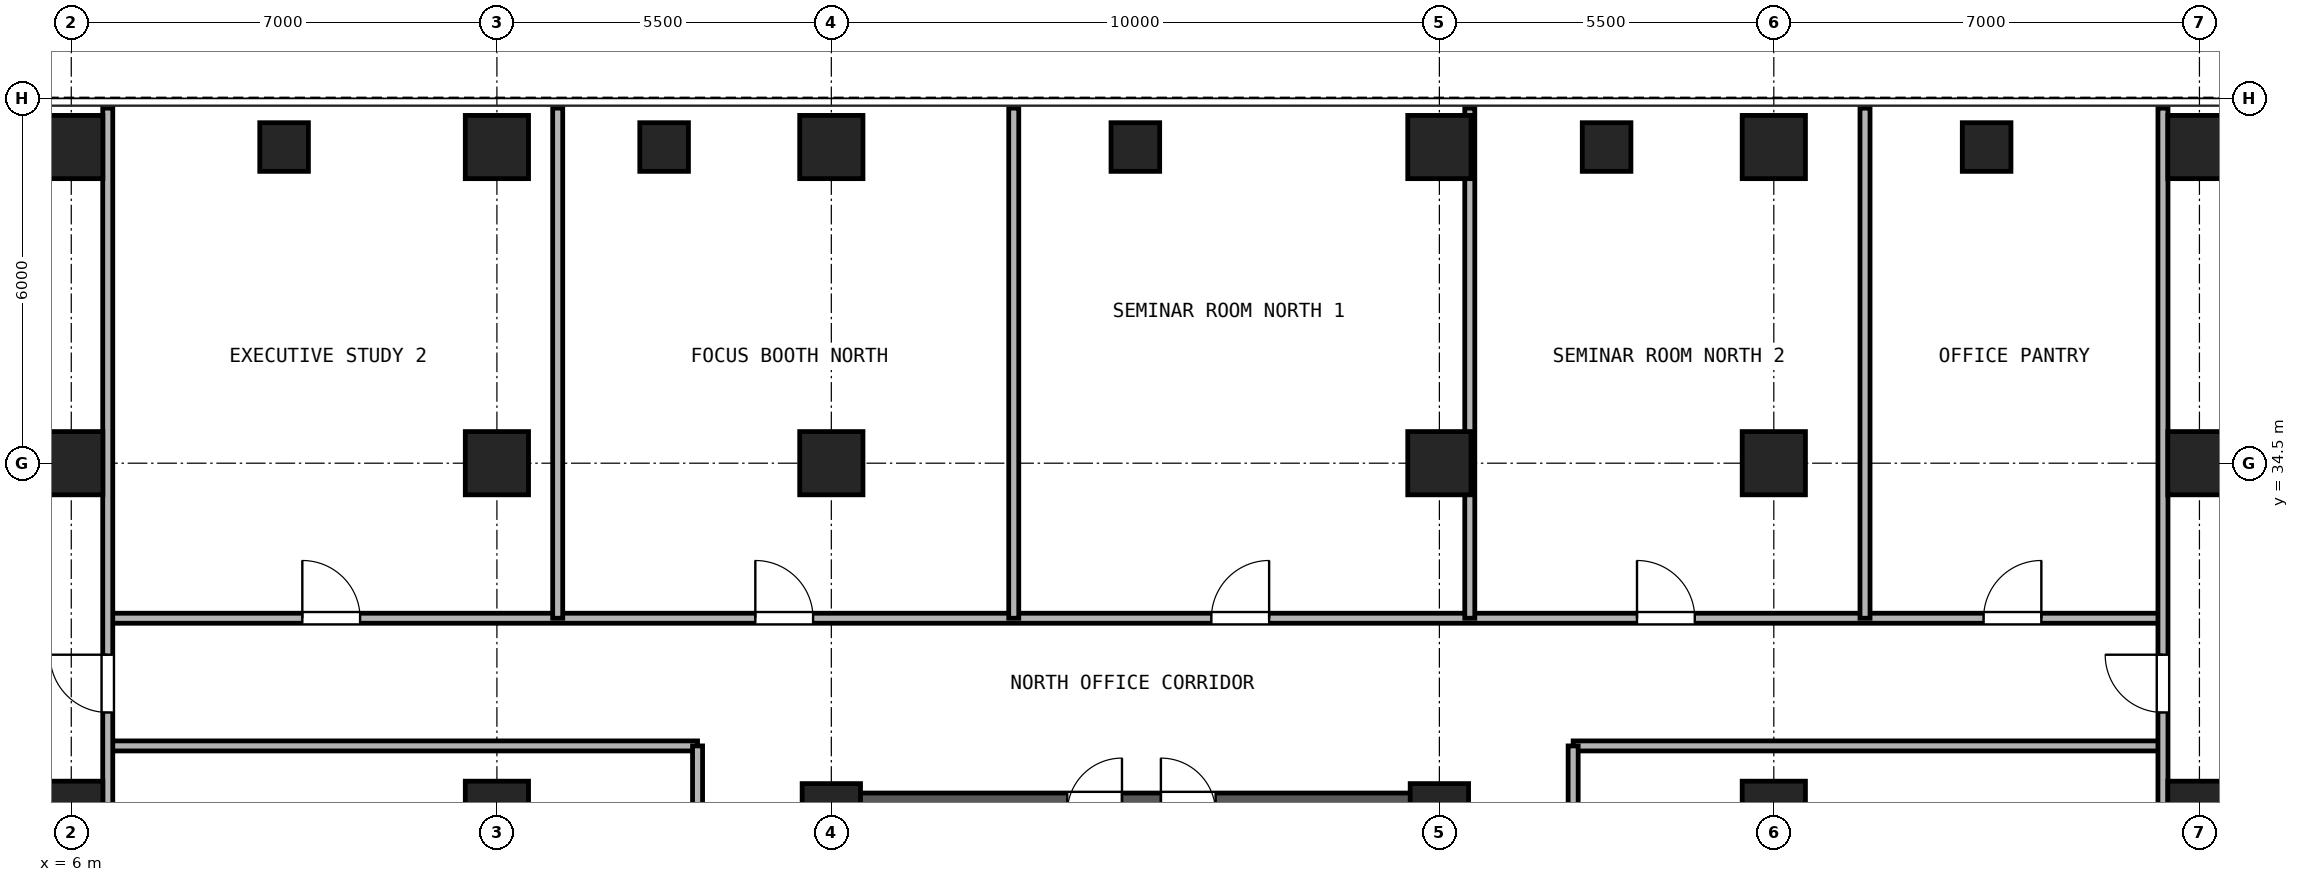
"""IFC4 building model, lengths in metres.
Left out: names, types, materials, properties, quantities, classifications, styles, units other than length and angle.
Written with IfcOpenShell. Run it as: python <this file> out.ifc"""

import sys

from ifc_helpers import new_model, si_unit, direction, frame, frame_2d, origin, origin_2d, place, context, subcontext, project, spatial, rectangle, hollow_rectangle, extrude, source, transform, mapped, element, fill, save


model = new_model("IFC4")
c1 = context("Model", 3, precision=1e-05, world=origin(), true_north=direction((0.0, 1.0)))
c2 = subcontext(c1, "Body", "Model", "MODEL_VIEW")
j1 = project(units=[si_unit("LENGTHUNIT", "METRE"), si_unit("PLANEANGLEUNIT", "RADIAN")], contexts=[c1])
p1 = place(None, origin())
s1 = spatial("IfcSite", under=j1, at=p1, CompositionType="ELEMENT")
p2 = place(p1, origin())
s2 = spatial("IfcBuilding", under=s1, at=p2, CompositionType="ELEMENT")
p3 = place(p2, frame((0.0, 0.0, 81.0)))
s3 = spatial("IfcBuildingStorey", under=s2, at=p3, CompositionType="ELEMENT", Elevation=81.0)
m1 = source(origin(), c2, "Body", "SweptSolid", [
    extrude(hollow_rectangle(XDim=1.04, YDim=1.04, WallThickness=0.065, at=origin_2d()), origin(), (0.0, 0.0, 1.0), 3.32),
])
for number, where, z_axis, x_axis in (
    (1, (6.0, 39.7, 0.0), (0.0, 0.0, 1.0), (1.0, 0.0, 0.0)),
    (2, (13.0, 39.7, 0.0), (0.0, 0.0, 1.0), (1.0, 0.0, 0.0)),
    (3, (18.5, 39.7, 0.0), (0.0, 0.0, 1.0), (1.0, 0.0, 0.0)),
    (4, (28.5, 39.7, 0.0), (0.0, 0.0, 1.0), (1.0, 0.0, 0.0)),
    (5, (34.0, 39.7, 0.0), (0.0, 0.0, 1.0), (1.0, 0.0, 0.0)),
    (6, (41.0, 39.7, 0.0), (0.0, 0.0, 1.0), (1.0, 0.0, 0.0)),
    (7, (6.0, 28.75, 0.0), (0.0, 0.0, 1.0), (1.0, 0.0, 0.0)),
    (8, (6.0, 34.5, 0.0), (0.0, 0.0, 1.0), (1.0, 0.0, 0.0)),
    (9, (13.0, 28.75, 0.0), (0.0, 0.0, 1.0), (1.0, 0.0, 0.0)),
    (10, (13.0, 34.5, 0.0), (0.0, 0.0, 1.0), (1.0, 0.0, 0.0)),
):
    element("IfcColumn", number, at=place(p3, frame(where, z_axis=z_axis, x_axis=x_axis)), inside=s3, PredefinedType="COLUMN", context=c2, shape_type="MappedRepresentation", body=[
        mapped(m1, transform((0.0, 0.0, 0.0), x_axis=(1.0, 0.0, 0.0), y_axis=(0.0, 1.0, 0.0), z_axis=(0.0, 0.0, 1.0), scale=1.0)),
    ])
m2 = source(origin(), c2, "Body", "SweptSolid", [
    extrude(hollow_rectangle(XDim=0.96, YDim=0.96, WallThickness=0.06, at=origin_2d()), origin(), (0.0, 0.0, 1.0), 3.32),
])
p4 = place(p3, frame((18.5, 28.75, 0.0), z_axis=(0.0, 0.0, 1.0), x_axis=(1.0, 0.0, 0.0)))
e11 = element("IfcColumn", 11, at=p4, inside=s3, PredefinedType="COLUMN", context=c2, shape_type="MappedRepresentation", body=[
    mapped(m2, transform((0.0, 0.0, 0.0), x_axis=(1.0, 0.0, 0.0), y_axis=(0.0, 1.0, 0.0), z_axis=(0.0, 0.0, 1.0), scale=1.0)),
])
p5 = place(p3, frame((18.5, 34.5, 0.0), z_axis=(0.0, 0.0, 1.0), x_axis=(1.0, 0.0, 0.0)))
e12 = element("IfcColumn", 12, at=p5, inside=s3, PredefinedType="COLUMN", context=c2, shape_type="MappedRepresentation", body=[
    mapped(m1, transform((0.0, 0.0, 0.0), x_axis=(1.0, 0.0, 0.0), y_axis=(0.0, 1.0, 0.0), z_axis=(0.0, 0.0, 1.0), scale=1.0)),
])
p6 = place(p3, frame((28.5, 28.75, 0.0), z_axis=(0.0, 0.0, 1.0), x_axis=(1.0, 0.0, 0.0)))
e13 = element("IfcColumn", 13, at=p6, inside=s3, PredefinedType="COLUMN", context=c2, shape_type="MappedRepresentation", body=[
    mapped(m2, transform((0.0, 0.0, 0.0), x_axis=(1.0, 0.0, 0.0), y_axis=(0.0, 1.0, 0.0), z_axis=(0.0, 0.0, 1.0), scale=1.0)),
])
for number, where, z_axis, x_axis in (
    (14, (28.5, 34.5, 0.0), (0.0, 0.0, 1.0), (1.0, 0.0, 0.0)),
    (15, (34.0, 28.75, 0.0), (0.0, 0.0, 1.0), (1.0, 0.0, 0.0)),
    (16, (34.0, 34.5, 0.0), (0.0, 0.0, 1.0), (1.0, 0.0, 0.0)),
    (17, (41.0, 28.75, 0.0), (0.0, 0.0, 1.0), (1.0, 0.0, 0.0)),
    (18, (41.0, 34.5, 0.0), (0.0, 0.0, 1.0), (1.0, 0.0, 0.0)),
):
    element("IfcColumn", number, at=place(p3, frame(where, z_axis=z_axis, x_axis=x_axis)), inside=s3, PredefinedType="COLUMN", context=c2, shape_type="MappedRepresentation", body=[
        mapped(m1, transform((0.0, 0.0, 0.0), x_axis=(1.0, 0.0, 0.0), y_axis=(0.0, 1.0, 0.0), z_axis=(0.0, 0.0, 1.0), scale=1.0)),
    ])
m3 = source(origin(), c2, "Body", "SweptSolid", [
    extrude(hollow_rectangle(XDim=0.8, YDim=0.8, WallThickness=0.045, at=origin_2d()), origin(), (0.0, 0.0, 1.0), 3.32),
])
for number, where, z_axis, x_axis in (
    (19, (9.5, 39.7, 0.0), (0.0, 0.0, 1.0), (1.0, 0.0, 0.0)),
    (20, (15.75, 39.7, 0.0), (0.0, 0.0, 1.0), (1.0, 0.0, 0.0)),
    (21, (23.5, 39.7, 0.0), (0.0, 0.0, 1.0), (1.0, 0.0, 0.0)),
    (22, (31.25, 39.7, 0.0), (0.0, 0.0, 1.0), (1.0, 0.0, 0.0)),
    (23, (37.5, 39.7, 0.0), (0.0, 0.0, 1.0), (1.0, 0.0, 0.0)),
):
    element("IfcColumn", number, at=place(p3, frame(where, z_axis=z_axis, x_axis=x_axis)), inside=s3, PredefinedType="COLUMN", context=c2, shape_type="MappedRepresentation", body=[
        mapped(m3, transform((0.0, 0.0, 0.0), x_axis=(1.0, 0.0, 0.0), y_axis=(0.0, 1.0, 0.0), z_axis=(0.0, 0.0, 1.0), scale=1.0)),
    ])
p7 = place(p3, frame((18.175, 28.75, 0.0), z_axis=(0.0, 0.0, 1.0), x_axis=(1.0, 0.0, 0.0)))
e24 = element("IfcWall", 24, at=p7, inside=s3, PredefinedType="SHEAR", context=c2, shape_type="SweptSolid", body=[
    extrude(rectangle(XDim=10.65, YDim=0.65, at=frame_2d((5.325, 0.0))), origin(), (0.0, 0.0, 1.0), 3.32),
])
p8 = place(p7, frame((4.205, 0.0, 0.0)))
e25 = element("IfcOpeningElement", 25, at=p8, cuts=e24, PredefinedType="OPENING", context=c2, shape_type="SweptSolid", body=[
    extrude(rectangle(XDim=0.9, YDim=2.05, at=frame_2d((0.45, 1.025))), frame((0.0, 0.335, 0.0), z_axis=(0.0, -1.0, 0.0), x_axis=(1.0, 0.0, 0.0)), (0.0, 0.0, 1.0), 0.67),
])
p9 = place(p7, frame((5.745, 0.0, 0.0)))
e26 = element("IfcOpeningElement", 26, at=p9, cuts=e24, PredefinedType="OPENING", context=c2, shape_type="SweptSolid", body=[
    extrude(rectangle(XDim=0.9, YDim=2.05, at=frame_2d((0.45, 1.025))), frame((0.0, 0.335, 0.0), z_axis=(0.0, -1.0, 0.0), x_axis=(1.0, 0.0, 0.0)), (0.0, 0.0, 1.0), 0.67),
])
p10 = place(p3, frame((6.6, 31.95, 0.0), z_axis=(0.0, 0.0, 1.0), x_axis=(1.0, 0.0, 0.0)))
e27 = element("IfcWall", 27, at=p10, inside=s3, PredefinedType="PARTITIONING", context=c2, shape_type="SweptSolid", body=[
    extrude(rectangle(XDim=33.8, YDim=0.165, at=frame_2d((16.9, 0.0))), origin(), (0.0, 0.0, 1.0), 3.32),
])
p11 = place(p10, frame((3.2, 0.0, 0.0)))
e28 = element("IfcOpeningElement", 28, at=p11, cuts=e27, PredefinedType="OPENING", context=c2, shape_type="SweptSolid", body=[
    extrude(rectangle(XDim=0.95, YDim=2.15, at=frame_2d((0.475, 1.075))), frame((0.0, 0.093, 0.0), z_axis=(0.0, -1.0, 0.0), x_axis=(1.0, 0.0, 0.0)), (0.0, 0.0, 1.0), 0.185),
])
p12 = place(p10, frame((10.65, 0.0, 0.0)))
e29 = element("IfcOpeningElement", 29, at=p12, cuts=e27, PredefinedType="OPENING", context=c2, shape_type="SweptSolid", body=[
    extrude(rectangle(XDim=0.95, YDim=2.15, at=frame_2d((0.475, 1.075))), frame((0.0, 0.093, 0.0), z_axis=(0.0, -1.0, 0.0), x_axis=(1.0, 0.0, 0.0)), (0.0, 0.0, 1.0), 0.185),
])
p13 = place(p10, frame((18.15, 0.0, 0.0)))
e30 = element("IfcOpeningElement", 30, at=p13, cuts=e27, PredefinedType="OPENING", context=c2, shape_type="SweptSolid", body=[
    extrude(rectangle(XDim=0.95, YDim=2.15, at=frame_2d((0.475, 1.075))), frame((0.0, 0.093, 0.0), z_axis=(0.0, -1.0, 0.0), x_axis=(1.0, 0.0, 0.0)), (0.0, 0.0, 1.0), 0.185),
])
p14 = place(p10, frame((25.15, 0.0, 0.0)))
e31 = element("IfcOpeningElement", 31, at=p14, cuts=e27, PredefinedType="OPENING", context=c2, shape_type="SweptSolid", body=[
    extrude(rectangle(XDim=0.95, YDim=2.15, at=frame_2d((0.475, 1.075))), frame((0.0, 0.093, 0.0), z_axis=(0.0, -1.0, 0.0), x_axis=(1.0, 0.0, 0.0)), (0.0, 0.0, 1.0), 0.185),
])
p15 = place(p10, frame((30.85, 0.0, 0.0)))
e32 = element("IfcOpeningElement", 32, at=p15, cuts=e27, PredefinedType="OPENING", context=c2, shape_type="SweptSolid", body=[
    extrude(rectangle(XDim=0.95, YDim=2.15, at=frame_2d((0.475, 1.075))), frame((0.0, 0.093, 0.0), z_axis=(0.0, -1.0, 0.0), x_axis=(1.0, 0.0, 0.0)), (0.0, 0.0, 1.0), 0.185),
])
for number, where, z_axis, x_axis in (
    (33, (6.6, 29.85, 0.0), (0.0, 0.0, 1.0), (1.0, 0.0, 0.0)),
    (34, (30.7, 29.85, 0.0), (0.0, 0.0, 1.0), (1.0, 0.0, 0.0)),
):
    element("IfcWall", number, at=place(p3, frame(where, z_axis=z_axis, x_axis=x_axis)), inside=s3, PredefinedType="PARTITIONING", context=c2, shape_type="SweptSolid", body=[
        extrude(rectangle(XDim=9.7, YDim=0.165, at=frame_2d((4.85, 0.0))), origin(), (0.0, 0.0, 1.0), 3.32),
    ])
p16 = place(p3, frame((16.3, 9.9, 0.0), z_axis=(0.0, 0.0, 1.0), x_axis=(0.0, 1.0, 0.0)))
e35 = element("IfcWall", 35, at=p16, inside=s3, PredefinedType="PARTITIONING", context=c2, shape_type="SweptSolid", body=[
    extrude(rectangle(XDim=19.95, YDim=0.165, at=frame_2d((9.975, 0.0))), origin(), (0.0, 0.0, 1.0), 3.32),
])
p17 = place(p16, frame((5.937, 0.0, 0.0)))
e36 = element("IfcOpeningElement", 36, at=p17, cuts=e35, PredefinedType="OPENING", context=c2, shape_type="SweptSolid", body=[
    extrude(rectangle(XDim=0.95, YDim=2.15, at=frame_2d((0.475, 1.075))), frame((0.0, 0.093, 0.0), z_axis=(0.0, -1.0, 0.0), x_axis=(1.0, 0.0, 0.0)), (0.0, 0.0, 1.0), 0.185),
])
p18 = place(p16, frame((15.911, 0.0, 0.0)))
e37 = element("IfcOpeningElement", 37, at=p18, cuts=e35, PredefinedType="OPENING", context=c2, shape_type="SweptSolid", body=[
    extrude(rectangle(XDim=0.95, YDim=2.15, at=frame_2d((0.475, 1.075))), frame((0.0, 0.093, 0.0), z_axis=(0.0, -1.0, 0.0), x_axis=(1.0, 0.0, 0.0)), (0.0, 0.0, 1.0), 0.185),
])
p19 = place(p3, frame((30.7, 9.9, 0.0), z_axis=(0.0, 0.0, 1.0), x_axis=(0.0, 1.0, 0.0)))
e38 = element("IfcWall", 38, at=p19, inside=s3, PredefinedType="PARTITIONING", context=c2, shape_type="SweptSolid", body=[
    extrude(rectangle(XDim=19.95, YDim=0.165, at=frame_2d((9.975, 0.0))), origin(), (0.0, 0.0, 1.0), 3.32),
])
p20 = place(p19, frame((9.475, 0.0, 0.0)))
e39 = element("IfcOpeningElement", 39, at=p20, cuts=e38, PredefinedType="OPENING", context=c2, shape_type="SweptSolid", body=[
    extrude(rectangle(XDim=0.95, YDim=2.15, at=frame_2d((0.475, 1.075))), frame((0.0, 0.093, 0.0), z_axis=(0.0, -1.0, 0.0), x_axis=(1.0, 0.0, 0.0)), (0.0, 0.0, 1.0), 0.185),
])
p21 = place(p3, frame((6.6, 0.16, 0.0), z_axis=(0.0, 0.0, 1.0), x_axis=(0.0, 1.0, 0.0)))
e40 = element("IfcWall", 40, at=p21, inside=s3, PredefinedType="PARTITIONING", context=c2, shape_type="SweptSolid", body=[
    extrude(rectangle(XDim=40.18, YDim=0.165, at=frame_2d((20.09, 0.0))), origin(), (0.0, 0.0, 1.0), 3.32),
])
p22 = place(p21, frame((8.19, 0.0, 0.0)))
e41 = element("IfcOpeningElement", 41, at=p22, cuts=e40, PredefinedType="OPENING", context=c2, shape_type="SweptSolid", body=[
    extrude(rectangle(XDim=0.95, YDim=2.15, at=frame_2d((0.475, 1.075))), frame((0.0, 0.093, 0.0), z_axis=(0.0, -1.0, 0.0), x_axis=(1.0, 0.0, 0.0)), (0.0, 0.0, 1.0), 0.185),
])
p23 = place(p21, frame((30.24, 0.0, 0.0)))
e42 = element("IfcOpeningElement", 42, at=p23, cuts=e40, PredefinedType="OPENING", context=c2, shape_type="SweptSolid", body=[
    extrude(rectangle(XDim=0.95, YDim=2.15, at=frame_2d((0.475, 1.075))), frame((0.0, 0.093, 0.0), z_axis=(0.0, -1.0, 0.0), x_axis=(1.0, 0.0, 0.0)), (0.0, 0.0, 1.0), 0.185),
])
p24 = place(p3, frame((40.4, 0.16, 0.0), z_axis=(0.0, 0.0, 1.0), x_axis=(0.0, 1.0, 0.0)))
e43 = element("IfcWall", 43, at=p24, inside=s3, PredefinedType="PARTITIONING", context=c2, shape_type="SweptSolid", body=[
    extrude(rectangle(XDim=40.18, YDim=0.165, at=frame_2d((20.09, 0.0))), origin(), (0.0, 0.0, 1.0), 3.32),
])
p25 = place(p24, frame((8.19, 0.0, 0.0)))
e44 = element("IfcOpeningElement", 44, at=p25, cuts=e43, PredefinedType="OPENING", context=c2, shape_type="SweptSolid", body=[
    extrude(rectangle(XDim=0.95, YDim=2.15, at=frame_2d((0.475, 1.075))), frame((0.0, 0.093, 0.0), z_axis=(0.0, -1.0, 0.0), x_axis=(1.0, 0.0, 0.0)), (0.0, 0.0, 1.0), 0.185),
])
p26 = place(p24, frame((30.24, 0.0, 0.0)))
e45 = element("IfcOpeningElement", 45, at=p26, cuts=e43, PredefinedType="OPENING", context=c2, shape_type="SweptSolid", body=[
    extrude(rectangle(XDim=0.95, YDim=2.15, at=frame_2d((0.475, 1.075))), frame((0.0, 0.093, 0.0), z_axis=(0.0, -1.0, 0.0), x_axis=(1.0, 0.0, 0.0)), (0.0, 0.0, 1.0), 0.185),
])
for number, where, z_axis, x_axis in (
    (46, (14.0, 31.95, 0.0), (0.0, 0.0, 1.0), (0.0, 1.0, 0.0)),
    (47, (21.5, 31.95, 0.0), (0.0, 0.0, 1.0), (0.0, 1.0, 0.0)),
    (48, (29.0, 31.95, 0.0), (0.0, 0.0, 1.0), (0.0, 1.0, 0.0)),
    (49, (35.5, 31.95, 0.0), (0.0, 0.0, 1.0), (0.0, 1.0, 0.0)),
):
    element("IfcWall", number, at=place(p3, frame(where, z_axis=z_axis, x_axis=x_axis)), inside=s3, PredefinedType="PARTITIONING", context=c2, shape_type="SweptSolid", body=[
        extrude(rectangle(XDim=8.39, YDim=0.165, at=frame_2d((4.195, 0.0))), origin(), (0.0, 0.0, 1.0), 3.32),
    ])
p27 = place(p11, origin())
e50 = element("IfcDoor", 50, at=p27, inside=s3, OperationType="SINGLE_SWING_LEFT", PredefinedType="DOOR", context=c2, shape_type="SweptSolid", body=[
    extrude(rectangle(XDim=0.95, YDim=2.15, at=frame_2d((0.475, 1.075))), frame((0.0, 0.025, 0.0), z_axis=(0.0, -1.0, 0.0), x_axis=(1.0, 0.0, 0.0)), (0.0, 0.0, 1.0), 0.05),
])
fill(e28, e50)
p28 = place(p12, origin())
e51 = element("IfcDoor", 51, at=p28, inside=s3, OperationType="SINGLE_SWING_LEFT", PredefinedType="DOOR", context=c2, shape_type="SweptSolid", body=[
    extrude(rectangle(XDim=0.95, YDim=2.15, at=frame_2d((0.475, 1.075))), frame((0.0, 0.025, 0.0), z_axis=(0.0, -1.0, 0.0), x_axis=(1.0, 0.0, 0.0)), (0.0, 0.0, 1.0), 0.05),
])
fill(e29, e51)
p29 = place(p13, origin())
e52 = element("IfcDoor", 52, at=p29, inside=s3, OperationType="SINGLE_SWING_RIGHT", PredefinedType="DOOR", context=c2, shape_type="SweptSolid", body=[
    extrude(rectangle(XDim=0.95, YDim=2.15, at=frame_2d((0.475, 1.075))), frame((0.0, 0.025, 0.0), z_axis=(0.0, -1.0, 0.0), x_axis=(1.0, 0.0, 0.0)), (0.0, 0.0, 1.0), 0.05),
])
fill(e30, e52)
p30 = place(p14, origin())
e53 = element("IfcDoor", 53, at=p30, inside=s3, OperationType="SINGLE_SWING_LEFT", PredefinedType="DOOR", context=c2, shape_type="SweptSolid", body=[
    extrude(rectangle(XDim=0.95, YDim=2.15, at=frame_2d((0.475, 1.075))), frame((0.0, 0.025, 0.0), z_axis=(0.0, -1.0, 0.0), x_axis=(1.0, 0.0, 0.0)), (0.0, 0.0, 1.0), 0.05),
])
fill(e31, e53)
p31 = place(p15, origin())
e54 = element("IfcDoor", 54, at=p31, inside=s3, OperationType="SINGLE_SWING_RIGHT", PredefinedType="DOOR", context=c2, shape_type="SweptSolid", body=[
    extrude(rectangle(XDim=0.95, YDim=2.15, at=frame_2d((0.475, 1.075))), frame((0.0, 0.025, 0.0), z_axis=(0.0, -1.0, 0.0), x_axis=(1.0, 0.0, 0.0)), (0.0, 0.0, 1.0), 0.05),
])
fill(e32, e54)
p32 = place(p23, frame((0.95, 0.0, 0.0), z_axis=(0.0, 0.0, 1.0), x_axis=(-1.0, 0.0, 0.0)))
e55 = element("IfcDoor", 55, at=p32, inside=s3, OperationType="SINGLE_SWING_RIGHT", PredefinedType="DOOR", context=c2, shape_type="SweptSolid", body=[
    extrude(rectangle(XDim=0.95, YDim=2.15, at=frame_2d((0.475, 1.075))), frame((0.0, 0.025, 0.0), z_axis=(0.0, -1.0, 0.0), x_axis=(1.0, 0.0, 0.0)), (0.0, 0.0, 1.0), 0.05),
])
fill(e42, e55)
p33 = place(p26, origin())
e56 = element("IfcDoor", 56, at=p33, inside=s3, OperationType="SINGLE_SWING_RIGHT", PredefinedType="DOOR", context=c2, shape_type="SweptSolid", body=[
    extrude(rectangle(XDim=0.95, YDim=2.15, at=frame_2d((0.475, 1.075))), frame((0.0, 0.025, 0.0), z_axis=(0.0, -1.0, 0.0), x_axis=(1.0, 0.0, 0.0)), (0.0, 0.0, 1.0), 0.05),
])
fill(e45, e56)
save(model, sys.argv[1])
